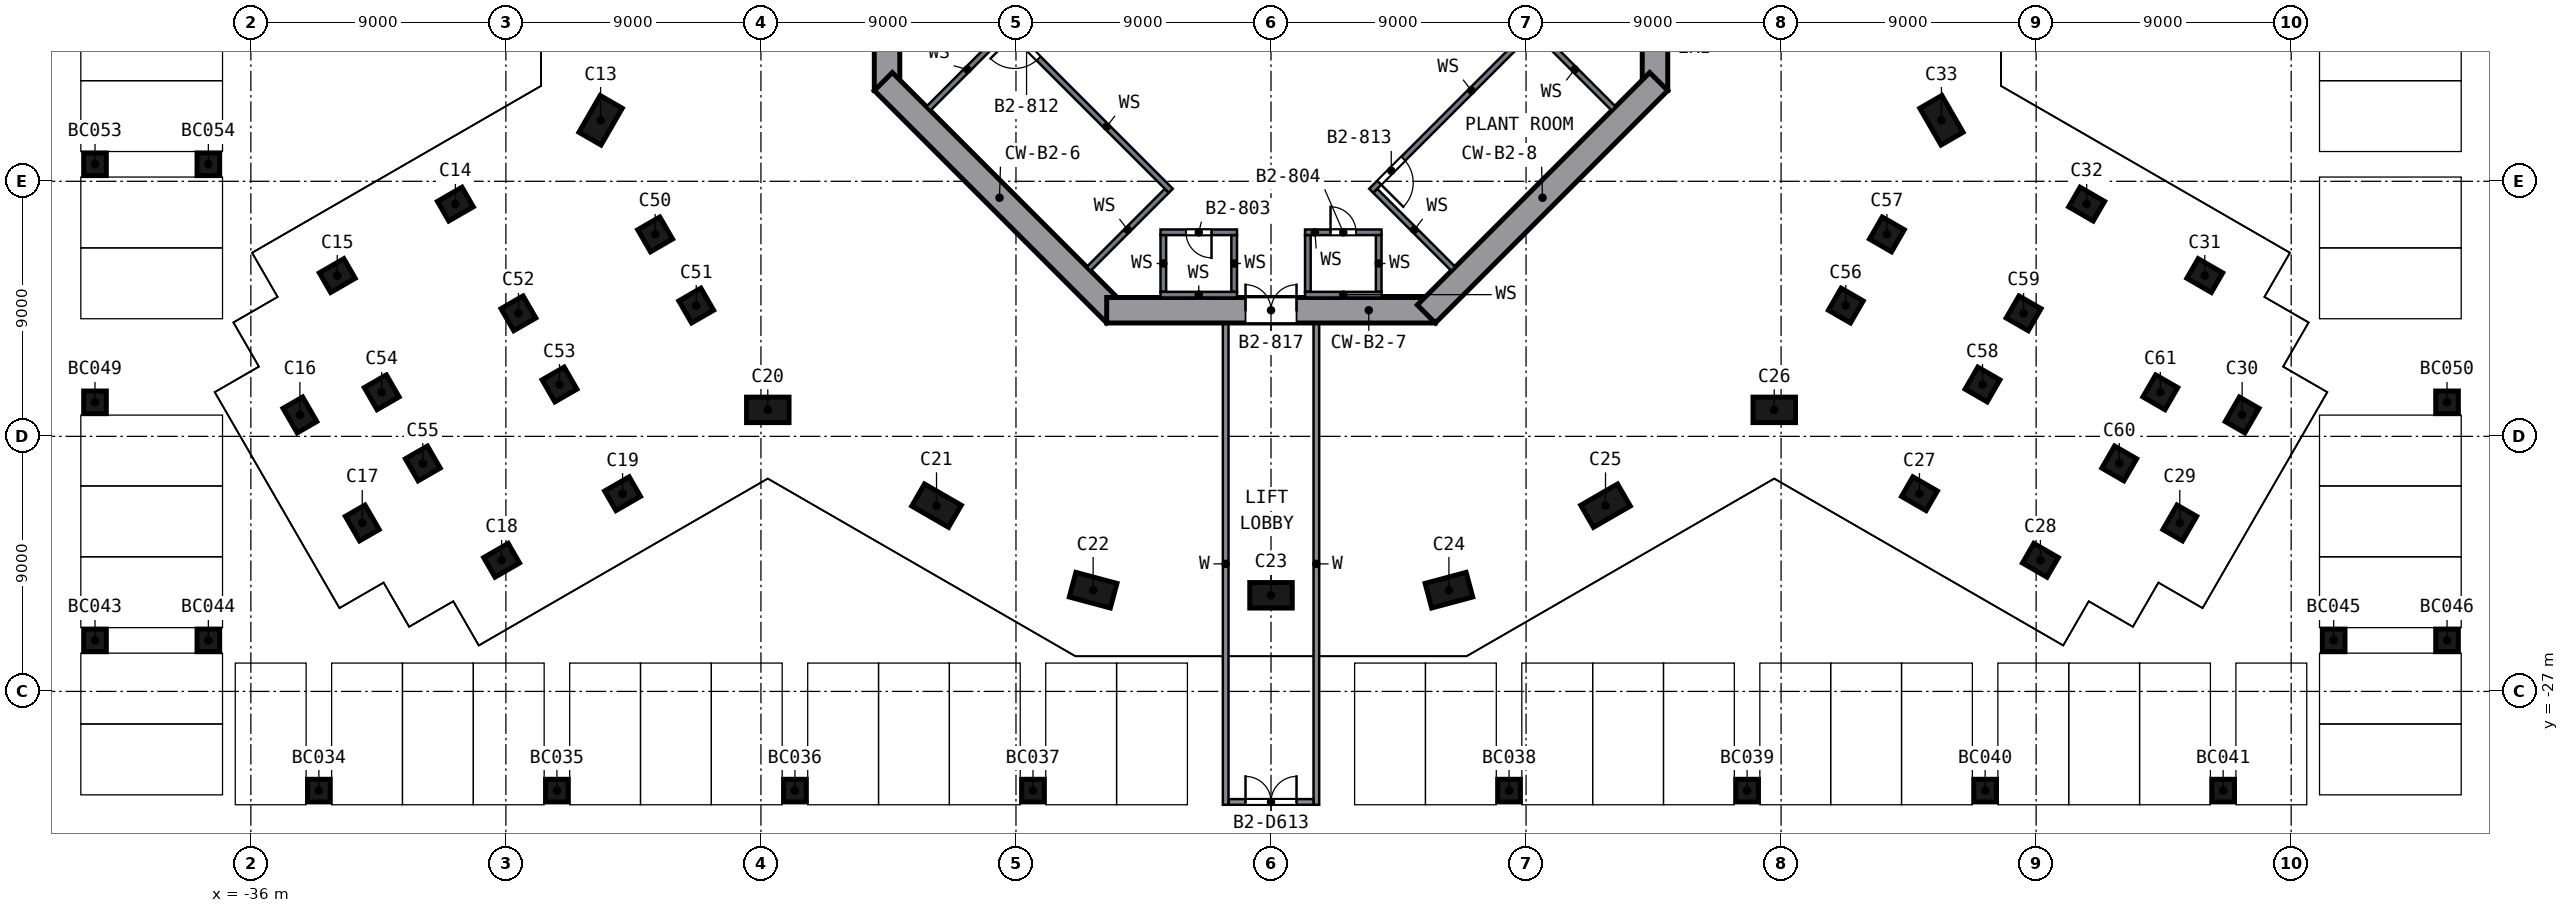
"""IFC4 building model, lengths in metres.
Left out: names, types, materials, properties, quantities, classifications, styles, units other than length and angle.
Written with IfcOpenShell. Run it as: python <this file> out.ifc"""

import sys

from ifc_helpers import new_model, si_unit, direction, frame, frame_2d, origin, origin_2d, place, context, subcontext, project, spatial, polyline, rectangle, outline, extrude, element, fill, save


model = new_model("IFC4")
c1 = context("Model", 3, precision=1e-05, world=origin(), true_north=direction((0.0, 1.0)))
c2 = subcontext(c1, "Body", "Model", "MODEL_VIEW")
j1 = project(units=[si_unit("LENGTHUNIT", "METRE"), si_unit("PLANEANGLEUNIT", "RADIAN")], contexts=[c1])
p1 = place(None, origin())
s1 = spatial("IfcSite", under=j1, at=p1, CompositionType="ELEMENT")
p2 = place(p1, origin())
s2 = spatial("IfcBuilding", under=s1, at=p2, CompositionType="ELEMENT")
p3 = place(p2, frame((0.0, 0.0, -7.8)))
s3 = spatial("IfcBuildingStorey", under=s2, at=p3, CompositionType="ELEMENT", Elevation=-7.8)
p4 = place(p3, frame((-23.658, -6.846, 0.0), z_axis=(0.0, 0.0, 1.0), x_axis=(0.5, 0.866025404, 0.0)))
e1 = element("IfcColumn", 1, at=p4, inside=s3, PredefinedType="COLUMN", context=c2, shape_type="SweptSolid", body=[
    extrude(rectangle(XDim=1.5, YDim=0.9, at=origin_2d()), origin(), (0.0, 0.0, 1.0), 3.45),
])
for number, where, z_axis, x_axis in (
    (2, (-28.783, -9.805, 0.0), (0.0, 0.0, 1.0), (-0.866, -0.5, 0.0)),
    (3, (-32.951, -12.327, 0.0), (0.0, 0.0, 1.0), (-0.866, -0.5, 0.0)),
    (4, (-34.269, -17.245, 0.0), (0.0, 0.0, 1.0), (0.5, -0.866, 0.0)),
    (5, (-32.069, -21.055, 0.0), (0.0, 0.0, 1.0), (0.5, -0.866, 0.0)),
    (6, (-27.151, -22.373, 0.0), (0.0, 0.0, 1.0), (0.866, 0.5, 0.0)),
    (7, (-22.883, -20.024, 0.0), (0.0, 0.0, 1.0), (0.866, 0.5, 0.0)),
):
    element("IfcColumn", number, at=place(p3, frame(where, z_axis=z_axis, x_axis=x_axis)), inside=s3, PredefinedType="COLUMN", context=c2, shape_type="SweptSolid", body=[
        extrude(rectangle(XDim=1.0, YDim=0.8, at=origin_2d()), origin(), (0.0, 0.0, 1.0), 3.45),
    ])
for number, where, z_axis, x_axis in (
    (8, (-17.758, -17.065, 0.0), (0.0, 0.0, 1.0), (-1.0, 0.0, 0.0)),
    (9, (-11.804, -20.445, 0.0), (0.0, 0.0, 1.0), (0.866, -0.5, 0.0)),
    (10, (-6.278, -23.428, 0.0), (0.0, 0.0, 1.0), (-0.966, 0.259, 0.0)),
    (11, (0.0, -23.608, 0.0), (0.0, 0.0, 1.0), (1.0, 0.0, 0.0)),
    (12, (6.278, -23.428, 0.0), (0.0, 0.0, 1.0), (-0.966, -0.259, 0.0)),
    (13, (11.804, -20.445, 0.0), (0.0, 0.0, 1.0), (0.866, 0.5, 0.0)),
    (14, (17.758, -17.065, 0.0), (0.0, 0.0, 1.0), (-1.0, 0.0, 0.0)),
):
    element("IfcColumn", number, at=place(p3, frame(where, z_axis=z_axis, x_axis=x_axis)), inside=s3, PredefinedType="COLUMN", context=c2, shape_type="SweptSolid", body=[
        extrude(rectangle(XDim=1.5, YDim=0.9, at=origin_2d()), origin(), (0.0, 0.0, 1.0), 3.45),
    ])
for number, where, z_axis, x_axis in (
    (15, (22.883, -20.024, 0.0), (0.0, 0.0, 1.0), (0.866, -0.5, 0.0)),
    (16, (27.151, -22.373, 0.0), (0.0, 0.0, 1.0), (0.866, -0.5, 0.0)),
    (17, (32.069, -21.055, 0.0), (0.0, 0.0, 1.0), (0.5, 0.866, 0.0)),
    (18, (34.269, -17.245, 0.0), (0.0, 0.0, 1.0), (0.5, 0.866, 0.0)),
    (19, (32.951, -12.327, 0.0), (0.0, 0.0, 1.0), (-0.866, 0.5, 0.0)),
    (20, (28.783, -9.805, 0.0), (0.0, 0.0, 1.0), (-0.866, 0.5, 0.0)),
):
    element("IfcColumn", number, at=place(p3, frame(where, z_axis=z_axis, x_axis=x_axis)), inside=s3, PredefinedType="COLUMN", context=c2, shape_type="SweptSolid", body=[
        extrude(rectangle(XDim=1.0, YDim=0.8, at=origin_2d()), origin(), (0.0, 0.0, 1.0), 3.45),
    ])
p5 = place(p3, frame((23.658, -6.846, 0.0), z_axis=(0.0, 0.0, 1.0), x_axis=(0.5, -0.866025404, 0.0)))
e21 = element("IfcColumn", 21, at=p5, inside=s3, PredefinedType="COLUMN", context=c2, shape_type="SweptSolid", body=[
    extrude(rectangle(XDim=1.5, YDim=0.9, at=origin_2d()), origin(), (0.0, 0.0, 1.0), 3.45),
])
for number, where, z_axis, x_axis in (
    (22, (-21.733, -10.873, 0.0), (0.0, 0.0, 1.0), (-0.866, -0.5, 0.0)),
    (23, (-20.283, -13.385, 0.0), (0.0, 0.0, 1.0), (-0.866, -0.5, 0.0)),
    (24, (-26.558, -13.659, 0.0), (0.0, 0.0, 1.0), (-0.866, -0.5, 0.0)),
    (25, (-25.108, -16.17, 0.0), (0.0, 0.0, 1.0), (-0.866, -0.5, 0.0)),
    (26, (-31.382, -16.444, 0.0), (0.0, 0.0, 1.0), (-0.866, -0.5, 0.0)),
    (27, (-29.932, -18.956, 0.0), (0.0, 0.0, 1.0), (-0.866, -0.5, 0.0)),
    (28, (20.283, -13.385, 0.0), (0.0, 0.0, 1.0), (0.866, -0.5, 0.0)),
    (29, (21.733, -10.873, 0.0), (0.0, 0.0, 1.0), (0.866, -0.5, 0.0)),
    (30, (25.108, -16.17, 0.0), (0.0, 0.0, 1.0), (0.866, -0.5, 0.0)),
    (31, (26.558, -13.659, 0.0), (0.0, 0.0, 1.0), (0.866, -0.5, 0.0)),
    (32, (29.932, -18.956, 0.0), (0.0, 0.0, 1.0), (0.866, -0.5, 0.0)),
    (33, (31.382, -16.444, 0.0), (0.0, 0.0, 1.0), (0.866, -0.5, 0.0)),
):
    element("IfcColumn", number, at=place(p3, frame(where, z_axis=z_axis, x_axis=x_axis)), inside=s3, PredefinedType="COLUMN", context=c2, shape_type="SweptSolid", body=[
        extrude(rectangle(XDim=0.9, YDim=0.9, at=origin_2d()), origin(), (0.0, 0.0, 1.0), 3.45),
    ])
p6 = place(p3, frame((13.55, -5.799, 0.0), z_axis=(0.0, 0.0, 1.0), x_axis=(0.0, 1.0, 0.0)))
e34 = element("IfcWall", 34, at=p6, inside=s3, PredefinedType="SHEAR", context=c2, shape_type="SweptSolid", body=[
    extrude(rectangle(XDim=11.598, YDim=0.9, at=frame_2d((5.799, 0.0))), origin(), (0.0, 0.0, 1.0), 3.9),
])
p7 = place(p6, frame((4.899, 0.0, 0.0)))
e35 = element("IfcOpeningElement", 35, at=p7, cuts=e34, PredefinedType="OPENING", context=c2, shape_type="SweptSolid", body=[
    extrude(rectangle(XDim=1.8, YDim=2.1, at=frame_2d((0.9, 1.05))), frame((0.0, 0.46, 0.0), z_axis=(0.0, -1.0, 0.0), x_axis=(1.0, 0.0, 0.0)), (0.0, 0.0, 1.0), 0.92),
])
p8 = place(p3, frame((-13.55, 5.799, 0.0), z_axis=(0.0, 0.0, 1.0), x_axis=(0.0, -1.0, 0.0)))
e36 = element("IfcWall", 36, at=p8, inside=s3, PredefinedType="SHEAR", context=c2, shape_type="SweptSolid", body=[
    extrude(rectangle(XDim=11.598, YDim=0.9, at=frame_2d((5.799, 0.0))), origin(), (0.0, 0.0, 1.0), 3.9),
])
p9 = place(p8, frame((4.899, 0.0, 0.0)))
e37 = element("IfcOpeningElement", 37, at=p9, cuts=e36, PredefinedType="OPENING", context=c2, shape_type="SweptSolid", body=[
    extrude(rectangle(XDim=1.8, YDim=2.1, at=frame_2d((0.9, 1.05))), frame((0.0, 0.46, 0.0), z_axis=(0.0, -1.0, 0.0), x_axis=(1.0, 0.0, 0.0)), (0.0, 0.0, 1.0), 0.92),
])
p10 = place(p3, frame((-13.682, -5.481, 0.0), z_axis=(0.0, 0.0, 1.0), x_axis=(0.707106781, -0.707106781, 0.0)))
e38 = element("IfcWall", 38, at=p10, inside=s3, PredefinedType="SHEAR", context=c2, shape_type="SweptSolid", body=[
    extrude(rectangle(XDim=11.598, YDim=0.9, at=frame_2d((5.799, 0.0))), origin(), (0.0, 0.0, 1.0), 3.9),
])
p11 = place(p3, frame((-5.799, -13.55, 0.0), z_axis=(0.0, 0.0, 1.0), x_axis=(1.0, 0.0, 0.0)))
e39 = element("IfcWall", 39, at=p11, inside=s3, PredefinedType="SHEAR", context=c2, shape_type="SweptSolid", body=[
    extrude(rectangle(XDim=11.598, YDim=0.9, at=frame_2d((5.799, 0.0))), origin(), (0.0, 0.0, 1.0), 3.9),
])
p12 = place(p11, frame((4.899, 0.0, 0.0)))
e40 = element("IfcOpeningElement", 40, at=p12, cuts=e39, PredefinedType="OPENING", context=c2, shape_type="SweptSolid", body=[
    extrude(rectangle(XDim=1.8, YDim=2.1, at=frame_2d((0.9, 1.05))), frame((0.0, 0.46, 0.0), z_axis=(0.0, -1.0, 0.0), x_axis=(1.0, 0.0, 0.0)), (0.0, 0.0, 1.0), 0.92),
])
p13 = place(p3, frame((5.481, -13.682, 0.0), z_axis=(0.0, 0.0, 1.0), x_axis=(0.707106781, 0.707106781, 0.0)))
e41 = element("IfcWall", 41, at=p13, inside=s3, PredefinedType="SHEAR", context=c2, shape_type="SweptSolid", body=[
    extrude(rectangle(XDim=11.598, YDim=0.9, at=frame_2d((5.799, 0.0))), origin(), (0.0, 0.0, 1.0), 3.9),
])
for number, where, z_axis, x_axis in (
    (42, (-33.6, -30.5, 0.0), (0.0, 0.0, 1.0), (1.0, 0.0, 0.0)),
    (43, (-25.2, -30.5, 0.0), (0.0, 0.0, 1.0), (1.0, 0.0, 0.0)),
    (44, (-16.8, -30.5, 0.0), (0.0, 0.0, 1.0), (1.0, 0.0, 0.0)),
    (45, (-8.4, -30.5, 0.0), (0.0, 0.0, 1.0), (1.0, 0.0, 0.0)),
    (46, (8.4, -30.5, 0.0), (0.0, 0.0, 1.0), (1.0, 0.0, 0.0)),
    (47, (16.8, -30.5, 0.0), (0.0, 0.0, 1.0), (1.0, 0.0, 0.0)),
    (48, (25.2, -30.5, 0.0), (0.0, 0.0, 1.0), (1.0, 0.0, 0.0)),
    (49, (33.6, -30.5, 0.0), (0.0, 0.0, 1.0), (1.0, 0.0, 0.0)),
    (50, (-41.5, -25.2, 0.0), (0.0, 0.0, 1.0), (1.0, 0.0, 0.0)),
    (51, (-37.5, -25.2, 0.0), (0.0, 0.0, 1.0), (1.0, 0.0, 0.0)),
    (52, (37.5, -25.2, 0.0), (0.0, 0.0, 1.0), (1.0, 0.0, 0.0)),
    (53, (41.5, -25.2, 0.0), (0.0, 0.0, 1.0), (1.0, 0.0, 0.0)),
    (54, (-41.5, -16.8, 0.0), (0.0, 0.0, 1.0), (1.0, 0.0, 0.0)),
    (55, (41.5, -16.8, 0.0), (0.0, 0.0, 1.0), (1.0, 0.0, 0.0)),
    (56, (-41.5, -8.4, 0.0), (0.0, 0.0, 1.0), (1.0, 0.0, 0.0)),
    (57, (-37.5, -8.4, 0.0), (0.0, 0.0, 1.0), (1.0, 0.0, 0.0)),
):
    element("IfcColumn", number, at=place(p3, frame(where, z_axis=z_axis, x_axis=x_axis)), inside=s3, PredefinedType="COLUMN", context=c2, shape_type="SweptSolid", body=[
        extrude(rectangle(XDim=0.8, YDim=0.8, at=origin_2d()), origin(), (0.0, 0.0, 1.0), 3.9),
    ])
p14 = place(p3, origin())
e58 = element("IfcWall", 58, at=p14, inside=s3, PredefinedType="SOLIDWALL", context=c2, shape_type="SweptSolid", body=[
    extrude(outline(polyline([(-1.2, -10.9), (-1.2, -12.9), (-1.4, -12.9), (-1.4, -10.9), (-1.2, -10.9)])), origin(), (0.0, 0.0, 1.0), 3.45),
])
p15 = place(p3, origin())
e59 = element("IfcWall", 59, at=p15, inside=s3, PredefinedType="SOLIDWALL", context=c2, shape_type="SweptSolid", body=[
    extrude(outline(polyline([(-3.7, -10.9), (-3.7, -12.9), (-3.9, -12.9), (-3.9, -10.9), (-3.7, -10.9)])), origin(), (0.0, 0.0, 1.0), 3.45),
])
p16 = place(p3, origin())
e60 = element("IfcWall", 60, at=p16, inside=s3, PredefinedType="SOLIDWALL", context=c2, shape_type="SweptSolid", body=[
    extrude(outline(polyline([(-1.2, -12.9), (-1.2, -13.1), (-3.9, -13.1), (-3.9, -12.9), (-1.2, -12.9)])), origin(), (0.0, 0.0, 1.0), 3.45),
])
p17 = place(p3, frame((-1.2, -10.8, 0.0), z_axis=(0.0, 0.0, 1.0), x_axis=(-1.0, 0.0, 0.0)))
e61 = element("IfcWall", 61, at=p17, inside=s3, PredefinedType="SOLIDWALL", context=c2, shape_type="SweptSolid", body=[
    extrude(rectangle(XDim=2.7, YDim=0.2, at=frame_2d((1.35, 0.0))), origin(), (0.0, 0.0, 1.0), 3.45),
])
p18 = place(p17, frame((0.9, 0.0, 0.0)))
e62 = element("IfcOpeningElement", 62, at=p18, cuts=e61, PredefinedType="OPENING", context=c2, shape_type="SweptSolid", body=[
    extrude(rectangle(XDim=0.9, YDim=2.1, at=frame_2d((0.45, 1.05))), frame((0.0, 0.11, 0.0), z_axis=(0.0, -1.0, 0.0), x_axis=(1.0, 0.0, 0.0)), (0.0, 0.0, 1.0), 0.22),
])
p19 = place(p3, origin())
e63 = element("IfcWall", 63, at=p19, inside=s3, PredefinedType="SOLIDWALL", context=c2, shape_type="SweptSolid", body=[
    extrude(outline(polyline([(1.2, -10.9), (1.4, -10.9), (1.4, -12.9), (1.2, -12.9), (1.2, -10.9)])), origin(), (0.0, 0.0, 1.0), 3.45),
])
p20 = place(p3, origin())
e64 = element("IfcWall", 64, at=p20, inside=s3, PredefinedType="SOLIDWALL", context=c2, shape_type="SweptSolid", body=[
    extrude(outline(polyline([(3.7, -10.9), (3.9, -10.9), (3.9, -12.9), (3.7, -12.9), (3.7, -10.9)])), origin(), (0.0, 0.0, 1.0), 3.45),
])
p21 = place(p3, origin())
e65 = element("IfcWall", 65, at=p21, inside=s3, PredefinedType="SOLIDWALL", context=c2, shape_type="SweptSolid", body=[
    extrude(outline(polyline([(1.2, -12.9), (3.9, -12.9), (3.9, -13.1), (1.2, -13.1), (1.2, -12.9)])), origin(), (0.0, 0.0, 1.0), 3.45),
])
p22 = place(p3, frame((1.2, -10.8, 0.0), z_axis=(0.0, 0.0, 1.0), x_axis=(1.0, 0.0, 0.0)))
e66 = element("IfcWall", 66, at=p22, inside=s3, PredefinedType="SOLIDWALL", context=c2, shape_type="SweptSolid", body=[
    extrude(rectangle(XDim=2.7, YDim=0.2, at=frame_2d((1.35, 0.0))), origin(), (0.0, 0.0, 1.0), 3.45),
])
p23 = place(p22, frame((0.9, 0.0, 0.0)))
e67 = element("IfcOpeningElement", 67, at=p23, cuts=e66, PredefinedType="OPENING", context=c2, shape_type="SweptSolid", body=[
    extrude(rectangle(XDim=0.9, YDim=2.1, at=frame_2d((0.45, 1.05))), frame((0.0, 0.11, 0.0), z_axis=(0.0, -1.0, 0.0), x_axis=(1.0, 0.0, 0.0)), (0.0, 0.0, 1.0), 0.22),
])
p24 = place(p3, frame((-3.535, -9.334, 0.0), z_axis=(0.0, 0.0, 1.0), x_axis=(-0.707106781, 0.707106781, 0.0)))
e68 = element("IfcWall", 68, at=p24, inside=s3, PredefinedType="SOLIDWALL", context=c2, shape_type="SweptSolid", body=[
    extrude(rectangle(XDim=8.2, YDim=0.2, at=frame_2d((4.1, 0.0))), origin(), (0.0, 0.0, 1.0), 3.45),
])
p25 = place(p24, frame((6.6, 0.0, 0.0)))
e69 = element("IfcOpeningElement", 69, at=p25, cuts=e68, PredefinedType="OPENING", context=c2, shape_type="SweptSolid", body=[
    extrude(rectangle(XDim=1.2, YDim=2.1, at=frame_2d((0.6, 1.05))), frame((0.0, 0.11, 0.0), z_axis=(0.0, -1.0, 0.0), x_axis=(1.0, 0.0, 0.0)), (0.0, 0.0, 1.0), 0.22),
])
for number, where, z_axis, x_axis in (
    (70, (-9.334, -3.677, 0.0), (0.0, 0.0, 1.0), (-0.707, -0.707, 0.0)),
    (71, (-3.677, -9.334, 0.0), (0.0, 0.0, 1.0), (-0.707, -0.707, 0.0)),
):
    element("IfcWall", number, at=place(p3, frame(where, z_axis=z_axis, x_axis=x_axis)), inside=s3, PredefinedType="SOLIDWALL", context=c2, shape_type="SweptSolid", body=[
        extrude(rectangle(XDim=3.9, YDim=0.2, at=frame_2d((1.95, 0.0))), origin(), (0.0, 0.0, 1.0), 3.45),
    ])
p26 = place(p3, frame((9.334, -3.535, 0.0), z_axis=(0.0, 0.0, 1.0), x_axis=(-0.707106781, -0.707106781, 0.0)))
e72 = element("IfcWall", 72, at=p26, inside=s3, PredefinedType="SOLIDWALL", context=c2, shape_type="SweptSolid", body=[
    extrude(rectangle(XDim=8.2, YDim=0.2, at=frame_2d((4.1, 0.0))), origin(), (0.0, 0.0, 1.0), 3.45),
])
p27 = place(p26, frame((6.6, 0.0, 0.0)))
e73 = element("IfcOpeningElement", 73, at=p27, cuts=e72, PredefinedType="OPENING", context=c2, shape_type="SweptSolid", body=[
    extrude(rectangle(XDim=1.2, YDim=2.1, at=frame_2d((0.6, 1.05))), frame((0.0, 0.11, 0.0), z_axis=(0.0, -1.0, 0.0), x_axis=(1.0, 0.0, 0.0)), (0.0, 0.0, 1.0), 0.22),
])
for number, where, z_axis, x_axis in (
    (74, (3.677, -9.334, 0.0), (0.0, 0.0, 1.0), (0.707, -0.707, 0.0)),
    (75, (9.334, -3.677, 0.0), (0.0, 0.0, 1.0), (0.707, -0.707, 0.0)),
):
    element("IfcWall", number, at=place(p3, frame(where, z_axis=z_axis, x_axis=x_axis)), inside=s3, PredefinedType="SOLIDWALL", context=c2, shape_type="SweptSolid", body=[
        extrude(rectangle(XDim=3.9, YDim=0.2, at=frame_2d((1.95, 0.0))), origin(), (0.0, 0.0, 1.0), 3.45),
    ])
for number, where, z_axis, x_axis in (
    (76, (-1.6, -31.0, 0.0), (0.0, 0.0, 1.0), (0.0, 1.0, 0.0)),
    (77, (1.6, -31.0, 0.0), (0.0, 0.0, 1.0), (0.0, 1.0, 0.0)),
):
    element("IfcWall", number, at=place(p3, frame(where, z_axis=z_axis, x_axis=x_axis)), inside=s3, PredefinedType="PARTITIONING", context=c2, shape_type="SweptSolid", body=[
        extrude(rectangle(XDim=17.0, YDim=0.2, at=frame_2d((8.5, 0.0))), origin(), (0.0, 0.0, 1.0), 3.45),
    ])
p28 = place(p3, frame((-1.5, -30.9, 0.0), z_axis=(0.0, 0.0, 1.0), x_axis=(1.0, 0.0, 0.0)))
e78 = element("IfcWall", 78, at=p28, inside=s3, PredefinedType="PARTITIONING", context=c2, shape_type="SweptSolid", body=[
    extrude(rectangle(XDim=3.0, YDim=0.2, at=frame_2d((1.5, 0.0))), origin(), (0.0, 0.0, 1.0), 3.45),
])
p29 = place(p28, frame((0.6, 0.0, 0.0)))
e79 = element("IfcOpeningElement", 79, at=p29, cuts=e78, PredefinedType="OPENING", context=c2, shape_type="SweptSolid", body=[
    extrude(rectangle(XDim=1.8, YDim=2.1, at=frame_2d((0.9, 1.05))), frame((0.0, 0.11, 0.0), z_axis=(0.0, -1.0, 0.0), x_axis=(1.0, 0.0, 0.0)), (0.0, 0.0, 1.0), 0.22),
])
p30 = place(p18, origin())
e80 = element("IfcDoor", 80, at=p30, inside=s3, OperationType="SINGLE_SWING_LEFT", PredefinedType="DOOR", context=c2, shape_type="SweptSolid", body=[
    extrude(rectangle(XDim=0.9, YDim=2.1, at=frame_2d((0.45, 1.05))), frame((0.0, 0.025, 0.0), z_axis=(0.0, -1.0, 0.0), x_axis=(1.0, 0.0, 0.0)), (0.0, 0.0, 1.0), 0.05),
])
fill(e62, e80)
p31 = place(p23, origin())
e81 = element("IfcDoor", 81, at=p31, inside=s3, OperationType="SINGLE_SWING_LEFT", PredefinedType="DOOR", context=c2, shape_type="SweptSolid", body=[
    extrude(rectangle(XDim=0.9, YDim=2.1, at=frame_2d((0.45, 1.05))), frame((0.0, 0.025, 0.0), z_axis=(0.0, -1.0, 0.0), x_axis=(1.0, 0.0, 0.0)), (0.0, 0.0, 1.0), 0.05),
])
fill(e67, e81)
p32 = place(p25, origin())
e82 = element("IfcDoor", 82, at=p32, inside=s3, OperationType="SINGLE_SWING_RIGHT", PredefinedType="DOOR", context=c2, shape_type="SweptSolid", body=[
    extrude(rectangle(XDim=1.2, YDim=2.1, at=frame_2d((0.6, 1.05))), frame((0.0, 0.025, 0.0), z_axis=(0.0, -1.0, 0.0), x_axis=(1.0, 0.0, 0.0)), (0.0, 0.0, 1.0), 0.05),
])
fill(e69, e82)
p33 = place(p27, origin())
e83 = element("IfcDoor", 83, at=p33, inside=s3, OperationType="SINGLE_SWING_RIGHT", PredefinedType="DOOR", context=c2, shape_type="SweptSolid", body=[
    extrude(rectangle(XDim=1.2, YDim=2.1, at=frame_2d((0.6, 1.05))), frame((0.0, 0.025, 0.0), z_axis=(0.0, -1.0, 0.0), x_axis=(1.0, 0.0, 0.0)), (0.0, 0.0, 1.0), 0.05),
])
fill(e73, e83)
p34 = place(p12, origin())
e84 = element("IfcDoor", 84, at=p34, inside=s3, OperationType="DOUBLE_DOOR_SINGLE_SWING", PredefinedType="DOOR", context=c2, shape_type="SweptSolid", body=[
    extrude(rectangle(XDim=1.8, YDim=2.1, at=frame_2d((0.9, 1.05))), frame((0.0, 0.025, 0.0), z_axis=(0.0, -1.0, 0.0), x_axis=(1.0, 0.0, 0.0)), (0.0, 0.0, 1.0), 0.05),
])
fill(e40, e84)
p35 = place(p29, origin())
e85 = element("IfcDoor", 85, at=p35, inside=s3, OperationType="DOUBLE_DOOR_SINGLE_SWING", PredefinedType="DOOR", context=c2, shape_type="SweptSolid", body=[
    extrude(rectangle(XDim=1.8, YDim=2.1, at=frame_2d((0.9, 1.05))), frame((0.0, 0.025, 0.0), z_axis=(0.0, -1.0, 0.0), x_axis=(1.0, 0.0, 0.0)), (0.0, 0.0, 1.0), 0.05),
])
fill(e79, e85)
save(model, sys.argv[1])
